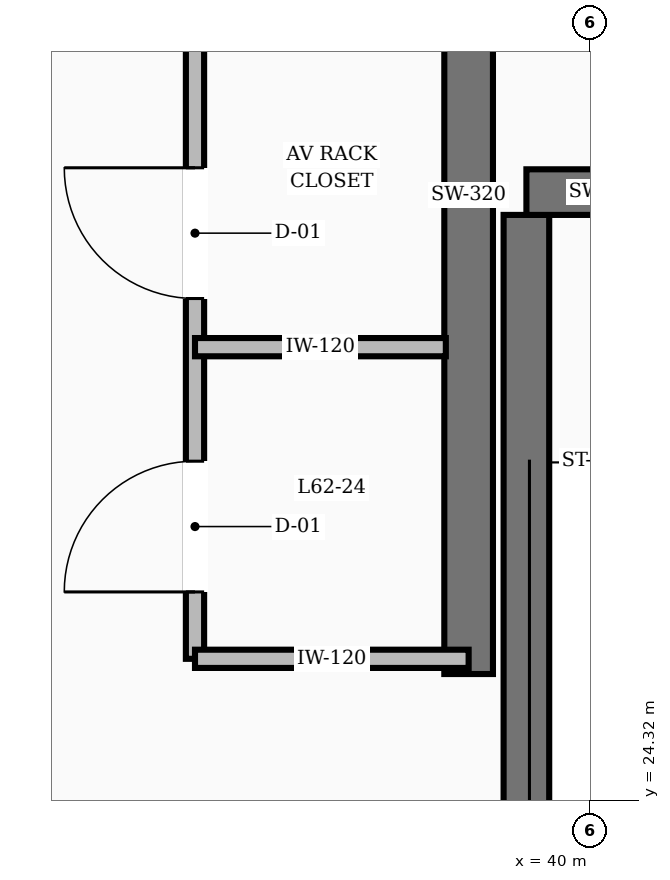
"""IFC4 building model, lengths in metres.
Left out: names, types, materials, properties, quantities, classifications, styles, units other than length and angle.
Written with IfcOpenShell. Run it as: python <this file> out.ifc"""

import sys

from ifc_helpers import new_model, si_unit, direction, frame, frame_2d, origin, place, context, subcontext, project, spatial, rectangle, extrude, element, fill, save


model = new_model("IFC4")
c1 = context("Model", 3, precision=1e-05, world=origin(), true_north=direction((0.0, 1.0)))
c2 = subcontext(c1, "Body", "Model", "MODEL_VIEW")
j1 = project(units=[si_unit("LENGTHUNIT", "METRE"), si_unit("PLANEANGLEUNIT", "RADIAN")], contexts=[c1])
p1 = place(None, origin())
s1 = spatial("IfcSite", under=j1, at=p1, CompositionType="ELEMENT")
p2 = place(p1, origin())
s2 = spatial("IfcBuilding", under=s1, at=p2, CompositionType="ELEMENT")
p3 = place(p2, frame((0.0, 0.0, 214.8)))
s3 = spatial("IfcBuildingStorey", under=s2, at=p3, CompositionType="ELEMENT", Elevation=214.8)
p4 = place(p3, frame((39.2, 25.15, 0.0), z_axis=(0.0, 0.0, 1.0), x_axis=(0.0, 1.0, 0.0)))
e1 = element("IfcWall", 1, at=p4, inside=s3, PredefinedType="SHEAR", context=c2, shape_type="SweptSolid", body=[
    extrude(rectangle(XDim=6.3, YDim=0.32, at=frame_2d((3.15, 0.0))), origin(), (0.0, 0.0, 1.0), 3.6),
])
p5 = place(p3, frame((39.58, 19.43, 0.0), z_axis=(0.0, 0.0, 1.0), x_axis=(0.0, 1.0, 0.0)))
e2 = element("IfcWall", 2, at=p5, inside=s3, PredefinedType="SHEAR", context=c2, shape_type="SweptSolid", body=[
    extrude(rectangle(XDim=8.74, YDim=0.3, at=frame_2d((4.37, 0.0))), origin(), (0.0, 0.0, 1.0), 3.6),
])
p6 = place(p3, frame((39.58, 28.32, 0.0), z_axis=(0.0, 0.0, 1.0), x_axis=(1.0, 0.0, 0.0)))
e3 = element("IfcWall", 3, at=p6, inside=s3, PredefinedType="SHEAR", context=c2, shape_type="SweptSolid", body=[
    extrude(rectangle(XDim=3.6, YDim=0.3, at=frame_2d((1.8, 0.0))), origin(), (0.0, 0.0, 1.0), 3.6),
])
p7 = place(p6, frame((1.3, 0.0, 0.0)))
e4 = element("IfcOpeningElement", 4, at=p7, cuts=e3, PredefinedType="OPENING", context=c2, shape_type="SweptSolid", body=[
    extrude(rectangle(XDim=1.1, YDim=2.1, at=frame_2d((0.55, 1.05))), frame((0.0, 0.16, 0.0), z_axis=(0.0, -1.0, 0.0), x_axis=(1.0, 0.0, 0.0)), (0.0, 0.0, 1.0), 0.32),
])
p8 = place(p3, frame((37.4, 25.25, 0.0), z_axis=(0.0, 0.0, 1.0), x_axis=(0.0, 1.0, 0.0)))
e5 = element("IfcWall", 5, at=p8, inside=s3, PredefinedType="PARTITIONING", context=c2, shape_type="SweptSolid", body=[
    extrude(rectangle(XDim=6.2, YDim=0.12, at=frame_2d((3.1, 0.0))), origin(), (0.0, 0.0, 1.0), 2.87),
])
p9 = place(p8, frame((0.8, 0.0, 0.0)))
e6 = element("IfcOpeningElement", 6, at=p9, cuts=e5, PredefinedType="OPENING", context=c2, shape_type="SweptSolid", body=[
    extrude(rectangle(XDim=0.86, YDim=2.1, at=frame_2d((0.43, 1.05))), frame((0.0, 0.07, 0.0), z_axis=(0.0, -1.0, 0.0), x_axis=(1.0, 0.0, 0.0)), (0.0, 0.0, 1.0), 0.14),
])
p10 = place(p8, frame((3.8, 0.0, 0.0)))
e7 = element("IfcOpeningElement", 7, at=p10, cuts=e5, PredefinedType="OPENING", context=c2, shape_type="SweptSolid", body=[
    extrude(rectangle(XDim=0.86, YDim=2.1, at=frame_2d((0.43, 1.05))), frame((0.0, 0.07, 0.0), z_axis=(0.0, -1.0, 0.0), x_axis=(1.0, 0.0, 0.0)), (0.0, 0.0, 1.0), 0.14),
])
p11 = place(p3, frame((37.4, 25.25, 0.0), z_axis=(0.0, 0.0, 1.0), x_axis=(1.0, 0.0, 0.0)))
e8 = element("IfcWall", 8, at=p11, inside=s3, PredefinedType="PARTITIONING", context=c2, shape_type="SweptSolid", body=[
    extrude(rectangle(XDim=1.8, YDim=0.12, at=frame_2d((0.9, 0.0))), origin(), (0.0, 0.0, 1.0), 2.87),
])
p12 = place(p3, frame((37.4, 28.3, 0.0), z_axis=(0.0, 0.0, 1.0), x_axis=(1.0, 0.0, 0.0)))
e9 = element("IfcWall", 9, at=p12, inside=s3, PredefinedType="PARTITIONING", context=c2, shape_type="SweptSolid", body=[
    extrude(rectangle(XDim=1.65, YDim=0.12, at=frame_2d((0.825, 0.0))), origin(), (0.0, 0.0, 1.0), 2.87),
])
p13 = place(p9, origin())
e10 = element("IfcDoor", 10, at=p13, inside=s3, OperationType="SINGLE_SWING_LEFT", PredefinedType="DOOR", context=c2, shape_type="SweptSolid", body=[
    extrude(rectangle(XDim=0.86, YDim=2.1, at=frame_2d((0.43, 1.05))), frame((0.0, 0.025, 0.0), z_axis=(0.0, -1.0, 0.0), x_axis=(1.0, 0.0, 0.0)), (0.0, 0.0, 1.0), 0.05),
])
fill(e6, e10)
p14 = place(p10, origin())
e11 = element("IfcDoor", 11, at=p14, inside=s3, OperationType="SINGLE_SWING_RIGHT", PredefinedType="DOOR", context=c2, shape_type="SweptSolid", body=[
    extrude(rectangle(XDim=0.86, YDim=2.1, at=frame_2d((0.43, 1.05))), frame((0.0, 0.025, 0.0), z_axis=(0.0, -1.0, 0.0), x_axis=(1.0, 0.0, 0.0)), (0.0, 0.0, 1.0), 0.05),
])
fill(e7, e11)
save(model, sys.argv[1])
